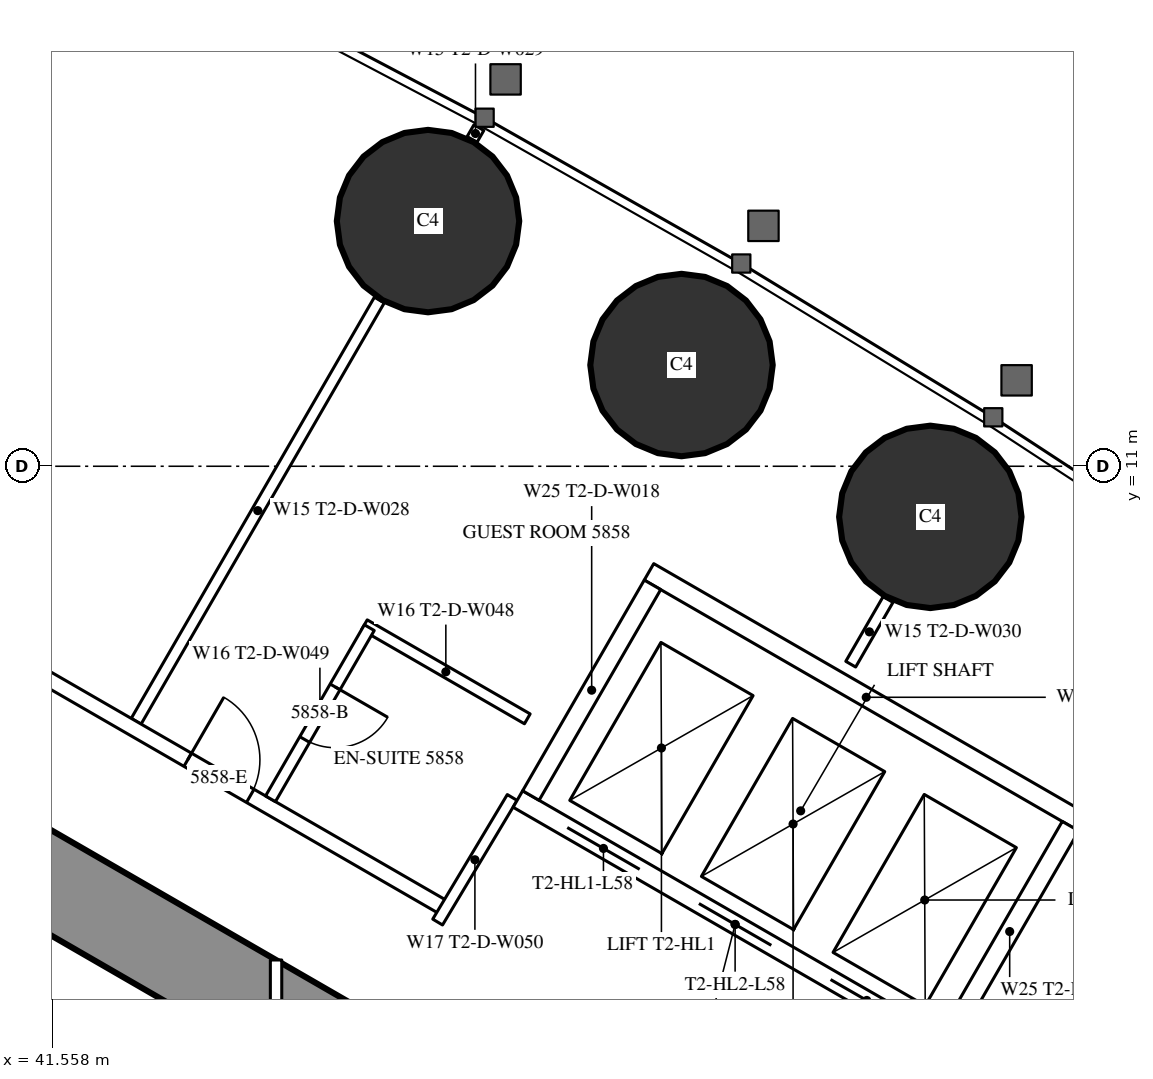
"""IFC4 building model, lengths in metres.
Left out: names, types, materials, properties, quantities, classifications, styles, units other than length and angle.
Written with IfcOpenShell. Run it as: python <this file> out.ifc"""

import sys

from ifc_helpers import new_model, si_unit, direction, frame, frame_2d, origin, origin_2d, place, context, subcontext, project, spatial, rectangle, circle, extrude, element, fill, save


model = new_model("IFC4")
c1 = context("Model", 3, precision=1e-05, world=origin(), true_north=direction((0.0, 1.0)))
c2 = subcontext(c1, "Body", "Model", "MODEL_VIEW")
j1 = project(units=[si_unit("LENGTHUNIT", "METRE"), si_unit("PLANEANGLEUNIT", "RADIAN")], contexts=[c1])
p1 = place(None, origin())
s1 = spatial("IfcSite", under=j1, at=p1, CompositionType="ELEMENT")
p2 = place(p1, origin())
s2 = spatial("IfcBuilding", under=s1, at=p2, CompositionType="ELEMENT")
p3 = place(p2, frame((0.0, 0.0, 218.9)))
s3 = spatial("IfcBuildingStorey", under=s2, at=p3, CompositionType="ELEMENT", Elevation=218.9)
for number, where, z_axis, x_axis in (
    (1, (53.108, 10.334, 0.0), (0.0, 0.0, 1.0), (1.0, 0.0, 0.0)),
    (2, (49.834, 12.332, 0.0), (0.0, 0.0, 1.0), (1.0, 0.0, 0.0)),
    (3, (46.499, 14.226, 0.0), (0.0, 0.0, 1.0), (1.0, 0.0, 0.0)),
):
    element("IfcColumn", number, at=place(p3, frame(where, z_axis=z_axis, x_axis=x_axis)), inside=s3, PredefinedType="COLUMN", context=c2, shape_type="SweptSolid", body=[
        extrude(circle(Radius=1.2, at=origin_2d()), origin(), (0.0, 0.0, 1.0), 3.6),
    ])
p4 = place(p3, frame((27.2, 13.8, 0.0), z_axis=(0.0, 0.0, 1.0), x_axis=(0.866024515034, -0.500001539357, 0.0)))
e4 = element("IfcWall", 4, at=p4, inside=s3, PredefinedType="SHEAR", context=c2, shape_type="SweptSolid", body=[
    extrude(rectangle(XDim=26.907, YDim=1.2, at=frame_2d((13.454, 0.0))), origin(), (0.0, 0.0, 1.0), 3.6),
])
p5 = place(p4, frame((4.6, 0.0, 0.0)))
e5 = element("IfcOpeningElement", 5, at=p5, cuts=e4, PredefinedType="OPENING", context=c2, shape_type="SweptSolid", body=[
    extrude(rectangle(XDim=1.0, YDim=2.2, at=frame_2d((0.5, 1.1))), frame((0.0, 0.61, 0.0), z_axis=(0.0, -1.0, 0.0), x_axis=(1.0, 0.0, 0.0)), (0.0, 0.0, 1.0), 1.22),
])
p6 = place(p4, frame((13.395, 0.0, 0.0)))
e6 = element("IfcOpeningElement", 6, at=p6, cuts=e4, PredefinedType="OPENING", context=c2, shape_type="SweptSolid", body=[
    extrude(rectangle(XDim=1.8, YDim=2.2, at=frame_2d((0.9, 1.1))), frame((0.0, 0.61, 0.0), z_axis=(0.0, -1.0, 0.0), x_axis=(1.0, 0.0, 0.0)), (0.0, 0.0, 1.0), 1.22),
])
p7 = place(p3, frame((42.66, 7.646, 0.0), z_axis=(0.0, 0.0, 1.0), x_axis=(0.499996592859, 0.866027370889, 0.0)))
e7 = element("IfcWall", 7, at=p7, inside=s3, PredefinedType="PARTITIONING", context=c2, shape_type="SweptSolid", body=[
    extrude(rectangle(XDim=6.398, YDim=0.15, at=frame_2d((3.199, 0.0))), origin(), (0.0, 0.0, 1.0), 2.45),
])
p8 = place(p3, frame((47.079, 15.3, 0.0), z_axis=(0.0, 0.0, 1.0), x_axis=(0.499212083968, 0.866479829667, 0.0)))
e8 = element("IfcWall", 8, at=p8, inside=s3, PredefinedType="PARTITIONING", context=c2, shape_type="SweptSolid", body=[
    extrude(rectangle(XDim=0.179, YDim=0.15, at=frame_2d((0.09, 0.0))), origin(), (0.0, 0.0, 1.0), 2.45),
])
p9 = place(p3, frame((52.06, 8.396, 0.0), z_axis=(0.0, 0.0, 1.0), x_axis=(0.500095379624, 0.865970329329, 0.0)))
e9 = element("IfcWall", 9, at=p9, inside=s3, PredefinedType="PARTITIONING", context=c2, shape_type="SweptSolid", body=[
    extrude(rectangle(XDim=0.982, YDim=0.15, at=frame_2d((0.491, 0.0))), origin(), (0.0, 0.0, 1.0), 3.35),
])
p10 = place(p3, frame((28.959, 15.44, 0.0), z_axis=(0.0, 0.0, 1.0), x_axis=(0.866028936079, -0.499993881836, 0.0)))
e10 = element("IfcWall", 10, at=p10, inside=s3, PredefinedType="PARTITIONING", context=c2, shape_type="SweptSolid", body=[
    extrude(rectangle(XDim=20.503, YDim=0.2, at=frame_2d((10.251, 0.0))), origin(), (0.0, 0.0, 1.0), 3.35),
])
p11 = place(p10, frame((16.603, 0.0, 0.0)))
e11 = element("IfcOpeningElement", 11, at=p11, cuts=e10, PredefinedType="OPENING", context=c2, shape_type="SweptSolid", body=[
    extrude(rectangle(XDim=0.95, YDim=2.2, at=frame_2d((0.475, 1.1))), frame((0.0, 0.11, 0.0), z_axis=(0.0, -1.0, 0.0), x_axis=(1.0, 0.0, 0.0)), (0.0, 0.0, 1.0), 0.22),
])
p12 = place(p10, frame((7.287, 0.0, 0.0)))
e12 = element("IfcOpeningElement", 12, at=p12, cuts=e10, PredefinedType="OPENING", context=c2, shape_type="SweptSolid", body=[
    extrude(rectangle(XDim=0.95, YDim=2.2, at=frame_2d((0.475, 1.1))), frame((0.0, 0.11, 0.0), z_axis=(0.0, -1.0, 0.0), x_axis=(1.0, 0.0, 0.0)), (0.0, 0.0, 1.0), 0.22),
])
p13 = place(p10, frame((2.244, 0.0, 0.0)))
e13 = element("IfcOpeningElement", 13, at=p13, cuts=e10, PredefinedType="OPENING", context=c2, shape_type="SweptSolid", body=[
    extrude(rectangle(XDim=1.8, YDim=2.03, at=frame_2d((0.9, 1.015))), frame((0.0, 0.11, 0.0), z_axis=(0.0, -1.0, 0.0), x_axis=(1.0, 0.0, 0.0)), (0.0, 0.0, 1.0), 0.22),
])
p14 = place(p3, frame((47.606, 6.642, 0.0), z_axis=(0.0, 0.0, 1.0), x_axis=(-0.51353662755, -0.858067673418, 0.0)))
e14 = element("IfcWall", 14, at=p14, inside=s3, PredefinedType="PARTITIONING", context=c2, shape_type="SweptSolid", body=[
    extrude(rectangle(XDim=1.91, YDim=0.15, at=frame_2d((0.955, 0.0))), origin(), (0.0, 0.0, 1.0), 3.35),
])
p15 = place(p3, frame((45.662, 8.914, 0.0), z_axis=(0.0, 0.0, 1.0), x_axis=(0.86604923931, -0.499958713387, 0.0)))
e15 = element("IfcWall", 15, at=p15, inside=s3, PredefinedType="PARTITIONING", context=c2, shape_type="SweptSolid", body=[
    extrude(rectangle(XDim=2.475, YDim=0.15, at=frame_2d((1.237, 0.0))), origin(), (0.0, 0.0, 1.0), 3.35),
])
p16 = place(p3, frame((44.427, 6.625, 0.0), z_axis=(0.0, 0.0, 1.0), x_axis=(0.500006934395, 0.866021400173, 0.0)))
e16 = element("IfcWall", 16, at=p16, inside=s3, PredefinedType="PARTITIONING", context=c2, shape_type="SweptSolid", body=[
    extrude(rectangle(XDim=2.6, YDim=0.15, at=frame_2d((1.3, 0.0))), origin(), (0.0, 0.0, 1.0), 3.35),
])
p17 = place(p16, frame((0.9, 0.0, 0.0)))
e17 = element("IfcOpeningElement", 17, at=p17, cuts=e16, PredefinedType="OPENING", context=c2, shape_type="SweptSolid", body=[
    extrude(rectangle(XDim=0.8, YDim=2.2, at=frame_2d((0.4, 1.1))), frame((0.0, 0.085, 0.0), z_axis=(0.0, -1.0, 0.0), x_axis=(1.0, 0.0, 0.0)), (0.0, 0.0, 1.0), 0.17),
])
p18 = place(p3, frame((44.5, -4.505, 0.0), z_axis=(0.0, 0.0, 1.0), x_axis=(0.0, 1.0, 0.0)))
e18 = element("IfcWall", 18, at=p18, inside=s3, PredefinedType="PARTITIONING", context=c2, shape_type="SweptSolid", body=[
    extrude(rectangle(XDim=9.009, YDim=0.15, at=frame_2d((4.505, 0.0))), origin(), (0.0, 0.0, 1.0), 3.35),
])
p19 = place(p18, frame((1.752, 0.0, 0.0)))
e19 = element("IfcOpeningElement", 19, at=p19, cuts=e18, PredefinedType="OPENING", context=c2, shape_type="SweptSolid", body=[
    extrude(rectangle(XDim=1.0, YDim=2.2, at=frame_2d((0.5, 1.1))), frame((0.0, 0.085, 0.0), z_axis=(0.0, -1.0, 0.0), x_axis=(1.0, 0.0, 0.0)), (0.0, 0.0, 1.0), 0.17),
])
p20 = place(p18, frame((6.257, 0.0, 0.0)))
e20 = element("IfcOpeningElement", 20, at=p20, cuts=e18, PredefinedType="OPENING", context=c2, shape_type="SweptSolid", body=[
    extrude(rectangle(XDim=1.0, YDim=2.2, at=frame_2d((0.5, 1.1))), frame((0.0, 0.085, 0.0), z_axis=(0.0, -1.0, 0.0), x_axis=(1.0, 0.0, 0.0)), (0.0, 0.0, 1.0), 0.17),
])
p21 = place(p3, frame((47.681, 6.622, 0.0), z_axis=(0.0, 0.0, 1.0), x_axis=(0.86603344179, -0.499986077507, 0.0)))
e21 = element("IfcWall", 21, at=p21, inside=s3, PredefinedType="PARTITIONING", context=c2, shape_type="SweptSolid", body=[
    extrude(rectangle(XDim=6.6, YDim=0.25, at=frame_2d((3.3, 0.0))), origin(), (0.0, 0.0, 1.0), 3.35),
])
p22 = place(p21, frame((0.75, 0.0, 0.0)))
e22 = element("IfcOpeningElement", 22, at=p22, cuts=e21, PredefinedType="OPENING", context=c2, shape_type="SweptSolid", body=[
    extrude(rectangle(XDim=1.1, YDim=2.2, at=frame_2d((0.55, 1.1))), frame((0.0, 0.135, 0.0), z_axis=(0.0, -1.0, 0.0), x_axis=(1.0, 0.0, 0.0)), (0.0, 0.0, 1.0), 0.27),
])
p23 = place(p21, frame((2.75, 0.0, 0.0)))
e23 = element("IfcOpeningElement", 23, at=p23, cuts=e21, PredefinedType="OPENING", context=c2, shape_type="SweptSolid", body=[
    extrude(rectangle(XDim=1.1, YDim=2.2, at=frame_2d((0.55, 1.1))), frame((0.0, 0.135, 0.0), z_axis=(0.0, -1.0, 0.0), x_axis=(1.0, 0.0, 0.0)), (0.0, 0.0, 1.0), 0.27),
])
p24 = place(p21, frame((4.75, 0.0, 0.0)))
e24 = element("IfcOpeningElement", 24, at=p24, cuts=e21, PredefinedType="OPENING", context=c2, shape_type="SweptSolid", body=[
    extrude(rectangle(XDim=1.1, YDim=2.2, at=frame_2d((0.55, 1.1))), frame((0.0, 0.135, 0.0), z_axis=(0.0, -1.0, 0.0), x_axis=(1.0, 0.0, 0.0)), (0.0, 0.0, 1.0), 0.27),
])
p25 = place(p3, frame((49.406, 9.611, 0.0), z_axis=(0.0, 0.0, 1.0), x_axis=(0.86603344179, -0.499986077507, 0.0)))
e25 = element("IfcWall", 25, at=p25, inside=s3, PredefinedType="PARTITIONING", context=c2, shape_type="SweptSolid", body=[
    extrude(rectangle(XDim=6.6, YDim=0.25, at=frame_2d((3.3, 0.0))), origin(), (0.0, 0.0, 1.0), 3.35),
])
p26 = place(p3, frame((47.852, 6.668, 0.0), z_axis=(0.0, 0.0, 1.0), x_axis=(0.499929347863, 0.866066190972, 0.0)))
e26 = element("IfcWall", 26, at=p26, inside=s3, PredefinedType="PARTITIONING", context=c2, shape_type="SweptSolid", body=[
    extrude(rectangle(XDim=3.201, YDim=0.25, at=frame_2d((1.6, 0.0))), origin(), (0.0, 0.0, 1.0), 3.35),
])
p27 = place(p3, frame((53.352, 3.493, 0.0), z_axis=(0.0, 0.0, 1.0), x_axis=(0.499872130319, 0.866099216793, 0.0)))
e27 = element("IfcWall", 27, at=p27, inside=s3, PredefinedType="PARTITIONING", context=c2, shape_type="SweptSolid", body=[
    extrude(rectangle(XDim=3.2, YDim=0.25, at=frame_2d((1.6, 0.0))), origin(), (0.0, 0.0, 1.0), 3.35),
])
p28 = place(p17, origin())
e28 = element("IfcDoor", 28, at=p28, inside=s3, OperationType="SINGLE_SWING_RIGHT", PredefinedType="DOOR", context=c2, shape_type="SweptSolid", body=[
    extrude(rectangle(XDim=0.8, YDim=2.2, at=frame_2d((0.4, 1.1))), frame((0.0, 0.025, 0.0), z_axis=(0.0, -1.0, 0.0), x_axis=(1.0, 0.0, 0.0)), (0.0, 0.0, 1.0), 0.05),
])
fill(e17, e28)
p29 = place(p11, origin())
e29 = element("IfcDoor", 29, at=p29, inside=s3, OperationType="SINGLE_SWING_LEFT", PredefinedType="DOOR", context=c2, shape_type="SweptSolid", body=[
    extrude(rectangle(XDim=0.95, YDim=2.2, at=frame_2d((0.475, 1.1))), frame((0.0, 0.025, 0.0), z_axis=(0.0, -1.0, 0.0), x_axis=(1.0, 0.0, 0.0)), (0.0, 0.0, 1.0), 0.05),
])
fill(e11, e29)
p30 = place(p22, origin())
e30 = element("IfcDoor", 30, at=p30, inside=s3, OperationType="DOUBLE_DOOR_SLIDING", PredefinedType="USERDEFINED", context=c2, shape_type="SweptSolid", body=[
    extrude(rectangle(XDim=1.1, YDim=2.2, at=frame_2d((0.55, 1.1))), frame((0.0, 0.025, 0.0), z_axis=(0.0, -1.0, 0.0), x_axis=(1.0, 0.0, 0.0)), (0.0, 0.0, 1.0), 0.05),
])
fill(e22, e30)
p31 = place(p23, origin())
e31 = element("IfcDoor", 31, at=p31, inside=s3, OperationType="DOUBLE_DOOR_SLIDING", PredefinedType="USERDEFINED", context=c2, shape_type="SweptSolid", body=[
    extrude(rectangle(XDim=1.1, YDim=2.2, at=frame_2d((0.55, 1.1))), frame((0.0, 0.025, 0.0), z_axis=(0.0, -1.0, 0.0), x_axis=(1.0, 0.0, 0.0)), (0.0, 0.0, 1.0), 0.05),
])
fill(e23, e31)
p32 = place(p24, origin())
e32 = element("IfcDoor", 32, at=p32, inside=s3, OperationType="DOUBLE_DOOR_SLIDING", PredefinedType="USERDEFINED", context=c2, shape_type="SweptSolid", body=[
    extrude(rectangle(XDim=1.1, YDim=2.2, at=frame_2d((0.55, 1.1))), frame((0.0, 0.025, 0.0), z_axis=(0.0, -1.0, 0.0), x_axis=(1.0, 0.0, 0.0)), (0.0, 0.0, 1.0), 0.05),
])
fill(e24, e32)
save(model, sys.argv[1])
